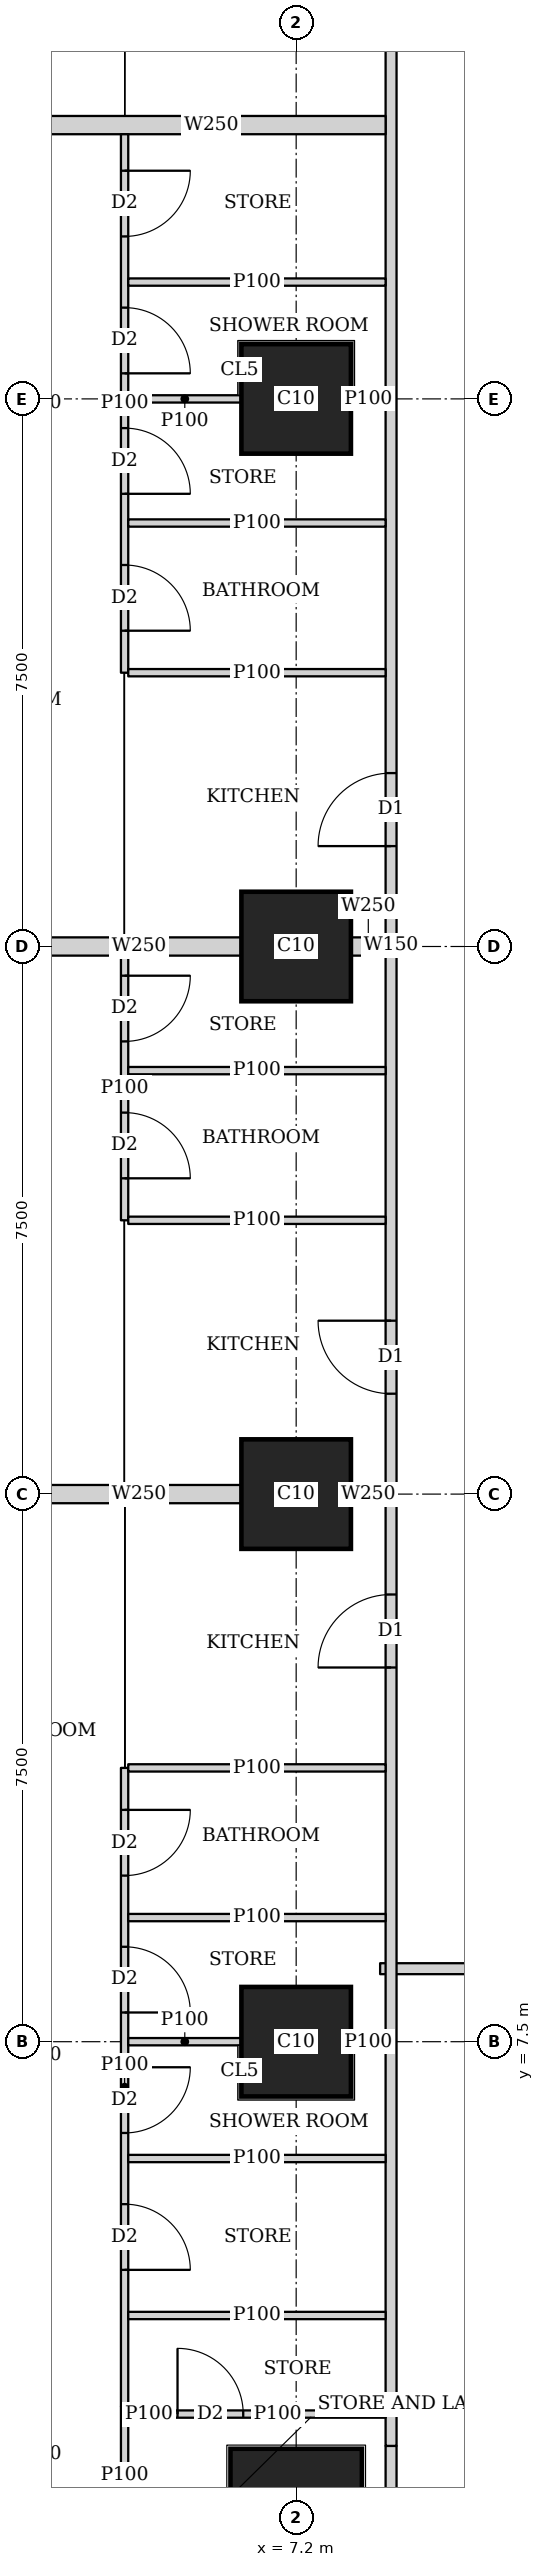
"""IFC4 building model, lengths in metres.
Left out: names, types, materials, properties, quantities, classifications, styles, units other than length and angle.
Written with IfcOpenShell. Run it as: python <this file> out.ifc"""

import sys

from ifc_helpers import new_model, si_unit, direction, frame, frame_2d, origin, origin_2d, place, context, subcontext, project, spatial, rectangle, extrude, element, fill, save


model = new_model("IFC4")
c1 = context("Model", 3, precision=1e-05, world=origin(), true_north=direction((0.0, 1.0)))
c2 = subcontext(c1, "Body", "Model", "MODEL_VIEW")
j1 = project(units=[si_unit("LENGTHUNIT", "METRE"), si_unit("PLANEANGLEUNIT", "RADIAN")], contexts=[c1])
p1 = place(None, origin())
s1 = spatial("IfcSite", under=j1, at=p1, CompositionType="ELEMENT")
p2 = place(p1, origin())
s2 = spatial("IfcBuilding", under=s1, at=p2, CompositionType="ELEMENT")
p3 = place(p2, frame((0.0, 0.0, 180.8)))
s3 = spatial("IfcBuildingStorey", under=s2, at=p3, CompositionType="ELEMENT", Elevation=180.8)
p4 = place(p3, frame((7.2, 1.025, 0.0), z_axis=(0.0, 0.0, 1.0), x_axis=(1.0, 0.0, 0.0)))
e1 = element("IfcColumn", 1, at=p4, inside=s3, PredefinedType="COLUMN", context=c2, shape_type="SweptSolid", body=[
    extrude(rectangle(XDim=1.8, YDim=1.8, at=origin_2d()), origin(), (0.0, 0.0, 1.0), 3.75),
])
for number, where, z_axis, x_axis in (
    (2, (7.2, 7.5, 0.0), (0.0, 0.0, 1.0), (1.0, 0.0, 0.0)),
    (3, (7.2, 15.0, 0.0), (0.0, 0.0, 1.0), (1.0, 0.0, 0.0)),
    (4, (7.2, 22.5, 0.0), (0.0, 0.0, 1.0), (1.0, 0.0, 0.0)),
    (5, (7.2, 30.0, 0.0), (0.0, 0.0, 1.0), (1.0, 0.0, 0.0)),
):
    element("IfcColumn", number, at=place(p3, frame(where, z_axis=z_axis, x_axis=x_axis)), inside=s3, PredefinedType="COLUMN", context=c2, shape_type="SweptSolid", body=[
        extrude(rectangle(XDim=1.5, YDim=1.5, at=origin_2d()), origin(), (0.0, 0.0, 1.0), 3.75),
    ])
p5 = place(p3, frame((8.5, 0.159, 0.0), z_axis=(0.0, 0.0, 1.0), x_axis=(0.0, 1.0, 0.0)))
e6 = element("IfcWall", 6, at=p5, inside=s3, PredefinedType="SOLIDWALL", context=c2, shape_type="SweptSolid", body=[
    extrude(rectangle(XDim=1.805, YDim=0.15, at=frame_2d((0.903, 0.0))), origin(), (0.0, 0.0, 1.0), 2.1),
])
p6 = place(p3, frame((8.5, 1.964, 0.0), z_axis=(0.0, 0.0, 1.0), x_axis=(0.0, 1.0, 0.0)))
e7 = element("IfcWall", 7, at=p6, inside=s3, PredefinedType="SOLIDWALL", context=c2, shape_type="SweptSolid", body=[
    extrude(rectangle(XDim=41.097, YDim=0.15, at=frame_2d((20.548, 0.0))), origin(), (0.0, 0.0, 1.0), 3.5),
])
p7 = place(p6, frame((10.661, 0.0, 0.0)))
e8 = element("IfcOpeningElement", 8, at=p7, cuts=e7, PredefinedType="OPENING", context=c2, shape_type="SweptSolid", body=[
    extrude(rectangle(XDim=1.0, YDim=2.1, at=frame_2d((0.5, 1.05))), frame((0.0, 0.085, 0.0), z_axis=(0.0, -1.0, 0.0), x_axis=(1.0, 0.0, 0.0)), (0.0, 0.0, 1.0), 0.17),
])
p8 = place(p6, frame((14.411, 0.0, 0.0)))
e9 = element("IfcOpeningElement", 9, at=p8, cuts=e7, PredefinedType="OPENING", context=c2, shape_type="SweptSolid", body=[
    extrude(rectangle(XDim=1.0, YDim=2.1, at=frame_2d((0.5, 1.05))), frame((0.0, 0.085, 0.0), z_axis=(0.0, -1.0, 0.0), x_axis=(1.0, 0.0, 0.0)), (0.0, 0.0, 1.0), 0.17),
])
p9 = place(p6, frame((21.911, 0.0, 0.0)))
e10 = element("IfcOpeningElement", 10, at=p9, cuts=e7, PredefinedType="OPENING", context=c2, shape_type="SweptSolid", body=[
    extrude(rectangle(XDim=1.0, YDim=2.1, at=frame_2d((0.5, 1.05))), frame((0.0, 0.085, 0.0), z_axis=(0.0, -1.0, 0.0), x_axis=(1.0, 0.0, 0.0)), (0.0, 0.0, 1.0), 0.17),
])
p10 = place(p6, frame((33.161, 0.0, 0.0)))
e11 = element("IfcOpeningElement", 11, at=p10, cuts=e7, PredefinedType="OPENING", context=c2, shape_type="SweptSolid", body=[
    extrude(rectangle(XDim=1.0, YDim=2.1, at=frame_2d((0.5, 1.05))), frame((0.0, 0.085, 0.0), z_axis=(0.0, -1.0, 0.0), x_axis=(1.0, 0.0, 0.0)), (0.0, 0.0, 1.0), 0.17),
])
p11 = place(p3, frame((40.053, 8.5, 0.0), z_axis=(0.0, 0.0, 1.0), x_axis=(-1.0, 0.0, 0.0)))
e12 = element("IfcWall", 12, at=p11, inside=s3, PredefinedType="SOLIDWALL", context=c2, shape_type="SweptSolid", body=[
    extrude(rectangle(XDim=31.703, YDim=0.15, at=frame_2d((15.852, 0.0))), origin(), (0.0, 0.0, 1.0), 3.5),
])
p12 = place(p11, frame((28.103, 0.0, 0.0)))
e13 = element("IfcOpeningElement", 13, at=p12, cuts=e12, PredefinedType="OPENING", context=c2, shape_type="SweptSolid", body=[
    extrude(rectangle(XDim=1.0, YDim=2.1, at=frame_2d((0.5, 1.05))), frame((0.0, 0.085, 0.0), z_axis=(0.0, -1.0, 0.0), x_axis=(1.0, 0.0, 0.0)), (0.0, 0.0, 1.0), 0.17),
])
p13 = place(p11, frame((15.953, 0.0, 0.0)))
e14 = element("IfcOpeningElement", 14, at=p13, cuts=e12, PredefinedType="OPENING", context=c2, shape_type="SweptSolid", body=[
    extrude(rectangle(XDim=1.0, YDim=2.1, at=frame_2d((0.5, 1.05))), frame((0.0, 0.085, 0.0), z_axis=(0.0, -1.0, 0.0), x_axis=(1.0, 0.0, 0.0)), (0.0, 0.0, 1.0), 0.17),
])
p14 = place(p11, frame((8.753, 0.0, 0.0)))
e15 = element("IfcOpeningElement", 15, at=p14, cuts=e12, PredefinedType="OPENING", context=c2, shape_type="SweptSolid", body=[
    extrude(rectangle(XDim=1.0, YDim=2.1, at=frame_2d((0.5, 1.05))), frame((0.0, 0.085, 0.0), z_axis=(0.0, -1.0, 0.0), x_axis=(1.0, 0.0, 0.0)), (0.0, 0.0, 1.0), 0.17),
])
p15 = place(p3, frame((4.85, 0.634, 0.0), z_axis=(0.0, 0.0, 1.0), x_axis=(0.0, 1.0, 0.0)))
e16 = element("IfcWall", 16, at=p15, inside=s3, PredefinedType="PARTITIONING", context=c2, shape_type="SweptSolid", body=[
    extrude(rectangle(XDim=1.871, YDim=0.1, at=frame_2d((0.936, 0.0))), origin(), (0.0, 0.0, 1.0), 2.1),
])
p16 = place(p3, frame((4.85, 2.505, 0.0), z_axis=(0.0, 0.0, 1.0), x_axis=(0.0, 1.0, 0.0)))
e17 = element("IfcWall", 17, at=p16, inside=s3, PredefinedType="PARTITIONING", context=c2, shape_type="SweptSolid", body=[
    extrude(rectangle(XDim=8.745, YDim=0.1, at=frame_2d((4.373, 0.0))), origin(), (0.0, 0.0, 1.0), 3.5),
])
p17 = place(p16, frame((7.27, 0.0, 0.0)))
e18 = element("IfcOpeningElement", 18, at=p17, cuts=e17, PredefinedType="OPENING", context=c2, shape_type="SweptSolid", body=[
    extrude(rectangle(XDim=0.9, YDim=2.1, at=frame_2d((0.45, 1.05))), frame((0.0, 0.06, 0.0), z_axis=(0.0, -1.0, 0.0), x_axis=(1.0, 0.0, 0.0)), (0.0, 0.0, 1.0), 0.12),
])
p18 = place(p16, frame((3.745, 0.0, 0.0)))
e19 = element("IfcOpeningElement", 19, at=p18, cuts=e17, PredefinedType="OPENING", context=c2, shape_type="SweptSolid", body=[
    extrude(rectangle(XDim=0.9, YDim=2.1, at=frame_2d((0.45, 1.05))), frame((0.0, 0.06, 0.0), z_axis=(0.0, -1.0, 0.0), x_axis=(1.0, 0.0, 0.0)), (0.0, 0.0, 1.0), 0.12),
])
p19 = place(p16, frame((5.395, 0.0, 0.0)))
e20 = element("IfcOpeningElement", 20, at=p19, cuts=e17, PredefinedType="OPENING", context=c2, shape_type="SweptSolid", body=[
    extrude(rectangle(XDim=0.9, YDim=2.1, at=frame_2d((0.45, 1.05))), frame((0.0, 0.06, 0.0), z_axis=(0.0, -1.0, 0.0), x_axis=(1.0, 0.0, 0.0)), (0.0, 0.0, 1.0), 0.12),
])
p20 = place(p16, frame((1.87, 0.0, 0.0)))
e21 = element("IfcOpeningElement", 21, at=p20, cuts=e17, PredefinedType="OPENING", context=c2, shape_type="SweptSolid", body=[
    extrude(rectangle(XDim=0.9, YDim=2.1, at=frame_2d((0.45, 1.05))), frame((0.0, 0.06, 0.0), z_axis=(0.0, -1.0, 0.0), x_axis=(1.0, 0.0, 0.0)), (0.0, 0.0, 1.0), 0.12),
])
p21 = place(p3, frame((4.9, 3.75, 0.0), z_axis=(0.0, 0.0, 1.0), x_axis=(1.0, 0.0, 0.0)))
e22 = element("IfcWall", 22, at=p21, inside=s3, PredefinedType="PARTITIONING", context=c2, shape_type="SweptSolid", body=[
    extrude(rectangle(XDim=3.525, YDim=0.1, at=frame_2d((1.763, 0.0))), origin(), (0.0, 0.0, 1.0), 3.5),
])
p22 = place(p3, frame((4.9, 7.5, 0.0), z_axis=(0.0, 0.0, 1.0), x_axis=(1.0, 0.0, 0.0)))
e23 = element("IfcWall", 23, at=p22, inside=s3, PredefinedType="PARTITIONING", context=c2, shape_type="SweptSolid", body=[
    extrude(rectangle(XDim=1.549, YDim=0.1, at=frame_2d((0.774, 0.0))), origin(), (0.0, 0.0, 1.0), 3.5),
])
p23 = place(p3, frame((7.951, 7.5, 0.0), z_axis=(0.0, 0.0, 1.0), x_axis=(1.0, 0.0, 0.0)))
e24 = element("IfcWall", 24, at=p23, inside=s3, PredefinedType="PARTITIONING", context=c2, shape_type="SweptSolid", body=[
    extrude(rectangle(XDim=0.474, YDim=0.1, at=frame_2d((0.237, 0.0))), origin(), (0.0, 0.0, 1.0), 3.5),
])
for number, where, z_axis, x_axis in (
    (25, (4.9, 11.25, 0.0), (0.0, 0.0, 1.0), (1.0, 0.0, 0.0)),
    (26, (4.9, 9.2, 0.0), (0.0, 0.0, 1.0), (1.0, 0.0, 0.0)),
    (27, (4.9, 5.9, 0.0), (0.0, 0.0, 1.0), (1.0, 0.0, 0.0)),
):
    element("IfcWall", number, at=place(p3, frame(where, z_axis=z_axis, x_axis=x_axis)), inside=s3, PredefinedType="PARTITIONING", context=c2, shape_type="SweptSolid", body=[
        extrude(rectangle(XDim=3.525, YDim=0.1, at=frame_2d((1.763, 0.0))), origin(), (0.0, 0.0, 1.0), 3.5),
    ])
p24 = place(p3, frame((4.85, 18.75, 0.0), z_axis=(0.0, 0.0, 1.0), x_axis=(0.0, 1.0, 0.0)))
e28 = element("IfcWall", 28, at=p24, inside=s3, PredefinedType="PARTITIONING", context=c2, shape_type="SweptSolid", body=[
    extrude(rectangle(XDim=3.625, YDim=0.1, at=frame_2d((1.812, 0.0))), origin(), (0.0, 0.0, 1.0), 3.5),
])
p25 = place(p24, frame((0.575, 0.0, 0.0)))
e29 = element("IfcOpeningElement", 29, at=p25, cuts=e28, PredefinedType="OPENING", context=c2, shape_type="SweptSolid", body=[
    extrude(rectangle(XDim=0.9, YDim=2.1, at=frame_2d((0.45, 1.05))), frame((0.0, 0.06, 0.0), z_axis=(0.0, -1.0, 0.0), x_axis=(1.0, 0.0, 0.0)), (0.0, 0.0, 1.0), 0.12),
])
p26 = place(p24, frame((2.45, 0.0, 0.0)))
e30 = element("IfcOpeningElement", 30, at=p26, cuts=e28, PredefinedType="OPENING", context=c2, shape_type="SweptSolid", body=[
    extrude(rectangle(XDim=0.9, YDim=2.1, at=frame_2d((0.45, 1.05))), frame((0.0, 0.06, 0.0), z_axis=(0.0, -1.0, 0.0), x_axis=(1.0, 0.0, 0.0)), (0.0, 0.0, 1.0), 0.12),
])
for number, where, z_axis, x_axis in (
    (31, (4.9, 18.75, 0.0), (0.0, 0.0, 1.0), (1.0, 0.0, 0.0)),
    (32, (4.9, 20.8, 0.0), (0.0, 0.0, 1.0), (1.0, 0.0, 0.0)),
):
    element("IfcWall", number, at=place(p3, frame(where, z_axis=z_axis, x_axis=x_axis)), inside=s3, PredefinedType="PARTITIONING", context=c2, shape_type="SweptSolid", body=[
        extrude(rectangle(XDim=3.525, YDim=0.1, at=frame_2d((1.763, 0.0))), origin(), (0.0, 0.0, 1.0), 3.5),
    ])
p27 = place(p3, frame((3.65, 15.0, 0.0), z_axis=(0.0, 0.0, 1.0), x_axis=(1.0, 0.0, 0.0)))
e33 = element("IfcWall", 33, at=p27, inside=s3, PredefinedType="SOLIDWALL", context=c2, shape_type="SweptSolid", body=[
    extrude(rectangle(XDim=2.799, YDim=0.25, at=frame_2d((1.399, 0.0))), origin(), (0.0, 0.0, 1.0), 3.5),
])
p28 = place(p3, frame((7.951, 15.0, 0.0), z_axis=(0.0, 0.0, 1.0), x_axis=(1.0, 0.0, 0.0)))
e34 = element("IfcWall", 34, at=p28, inside=s3, PredefinedType="SOLIDWALL", context=c2, shape_type="SweptSolid", body=[
    extrude(rectangle(XDim=0.474, YDim=0.25, at=frame_2d((0.237, 0.0))), origin(), (0.0, 0.0, 1.0), 3.5),
])
p29 = place(p3, frame((4.85, 26.25, 0.0), z_axis=(0.0, 0.0, 1.0), x_axis=(0.0, 1.0, 0.0)))
e35 = element("IfcWall", 35, at=p29, inside=s3, PredefinedType="PARTITIONING", context=c2, shape_type="SweptSolid", body=[
    extrude(rectangle(XDim=7.375, YDim=0.1, at=frame_2d((3.688, 0.0))), origin(), (0.0, 0.0, 1.0), 3.5),
])
p30 = place(p29, frame((0.575, 0.0, 0.0)))
e36 = element("IfcOpeningElement", 36, at=p30, cuts=e35, PredefinedType="OPENING", context=c2, shape_type="SweptSolid", body=[
    extrude(rectangle(XDim=0.9, YDim=2.1, at=frame_2d((0.45, 1.05))), frame((0.0, 0.06, 0.0), z_axis=(0.0, -1.0, 0.0), x_axis=(1.0, 0.0, 0.0)), (0.0, 0.0, 1.0), 0.12),
])
p31 = place(p29, frame((4.1, 0.0, 0.0)))
e37 = element("IfcOpeningElement", 37, at=p31, cuts=e35, PredefinedType="OPENING", context=c2, shape_type="SweptSolid", body=[
    extrude(rectangle(XDim=0.9, YDim=2.1, at=frame_2d((0.45, 1.05))), frame((0.0, 0.06, 0.0), z_axis=(0.0, -1.0, 0.0), x_axis=(1.0, 0.0, 0.0)), (0.0, 0.0, 1.0), 0.12),
])
p32 = place(p29, frame((2.45, 0.0, 0.0)))
e38 = element("IfcOpeningElement", 38, at=p32, cuts=e35, PredefinedType="OPENING", context=c2, shape_type="SweptSolid", body=[
    extrude(rectangle(XDim=0.9, YDim=2.1, at=frame_2d((0.45, 1.05))), frame((0.0, 0.06, 0.0), z_axis=(0.0, -1.0, 0.0), x_axis=(1.0, 0.0, 0.0)), (0.0, 0.0, 1.0), 0.12),
])
p33 = place(p29, frame((5.975, 0.0, 0.0)))
e39 = element("IfcOpeningElement", 39, at=p33, cuts=e35, PredefinedType="OPENING", context=c2, shape_type="SweptSolid", body=[
    extrude(rectangle(XDim=0.9, YDim=2.1, at=frame_2d((0.45, 1.05))), frame((0.0, 0.06, 0.0), z_axis=(0.0, -1.0, 0.0), x_axis=(1.0, 0.0, 0.0)), (0.0, 0.0, 1.0), 0.12),
])
p34 = place(p3, frame((4.9, 26.25, 0.0), z_axis=(0.0, 0.0, 1.0), x_axis=(1.0, 0.0, 0.0)))
e40 = element("IfcWall", 40, at=p34, inside=s3, PredefinedType="PARTITIONING", context=c2, shape_type="SweptSolid", body=[
    extrude(rectangle(XDim=3.525, YDim=0.1, at=frame_2d((1.763, 0.0))), origin(), (0.0, 0.0, 1.0), 3.5),
])
p35 = place(p3, frame((4.9, 30.0, 0.0), z_axis=(0.0, 0.0, 1.0), x_axis=(1.0, 0.0, 0.0)))
e41 = element("IfcWall", 41, at=p35, inside=s3, PredefinedType="PARTITIONING", context=c2, shape_type="SweptSolid", body=[
    extrude(rectangle(XDim=1.549, YDim=0.1, at=frame_2d((0.774, 0.0))), origin(), (0.0, 0.0, 1.0), 3.5),
])
p36 = place(p3, frame((7.951, 30.0, 0.0), z_axis=(0.0, 0.0, 1.0), x_axis=(1.0, 0.0, 0.0)))
e42 = element("IfcWall", 42, at=p36, inside=s3, PredefinedType="PARTITIONING", context=c2, shape_type="SweptSolid", body=[
    extrude(rectangle(XDim=0.474, YDim=0.1, at=frame_2d((0.237, 0.0))), origin(), (0.0, 0.0, 1.0), 3.5),
])
for number, where, z_axis, x_axis in (
    (43, (4.9, 28.3, 0.0), (0.0, 0.0, 1.0), (1.0, 0.0, 0.0)),
    (44, (4.9, 31.6, 0.0), (0.0, 0.0, 1.0), (1.0, 0.0, 0.0)),
):
    element("IfcWall", number, at=place(p3, frame(where, z_axis=z_axis, x_axis=x_axis)), inside=s3, PredefinedType="PARTITIONING", context=c2, shape_type="SweptSolid", body=[
        extrude(rectangle(XDim=3.525, YDim=0.1, at=frame_2d((1.763, 0.0))), origin(), (0.0, 0.0, 1.0), 3.5),
    ])
p37 = place(p3, frame((3.65, 22.5, 0.0), z_axis=(0.0, 0.0, 1.0), x_axis=(1.0, 0.0, 0.0)))
e45 = element("IfcWall", 45, at=p37, inside=s3, PredefinedType="SOLIDWALL", context=c2, shape_type="SweptSolid", body=[
    extrude(rectangle(XDim=2.799, YDim=0.25, at=frame_2d((1.399, 0.0))), origin(), (0.0, 0.0, 1.0), 3.5),
])
p38 = place(p3, frame((7.951, 22.5, 0.0), z_axis=(0.0, 0.0, 1.0), x_axis=(1.0, 0.0, 0.0)))
e46 = element("IfcWall", 46, at=p38, inside=s3, PredefinedType="SOLIDWALL", context=c2, shape_type="SweptSolid", body=[
    extrude(rectangle(XDim=0.474, YDim=0.25, at=frame_2d((0.237, 0.0))), origin(), (0.0, 0.0, 1.0), 3.5),
])
p39 = place(p3, frame((3.65, 33.75, 0.0), z_axis=(0.0, 0.0, 1.0), x_axis=(1.0, 0.0, 0.0)))
e47 = element("IfcWall", 47, at=p39, inside=s3, PredefinedType="SOLIDWALL", context=c2, shape_type="SweptSolid", body=[
    extrude(rectangle(XDim=4.775, YDim=0.25, at=frame_2d((2.388, 0.0))), origin(), (0.0, 0.0, 1.0), 3.5),
])
p40 = place(p3, frame((5.467, 2.4, 0.0), z_axis=(0.0, 0.0, 1.0), x_axis=(1.0, 0.0, 0.0)))
e48 = element("IfcWall", 48, at=p40, inside=s3, PredefinedType="PARTITIONING", context=c2, shape_type="SweptSolid", body=[
    extrude(rectangle(XDim=2.958, YDim=0.1, at=frame_2d((1.479, 0.0))), origin(), (0.0, 0.0, 1.0), 3.5),
])
p41 = place(p40, frame((0.108, 0.0, 0.0)))
e49 = element("IfcOpeningElement", 49, at=p41, cuts=e48, PredefinedType="OPENING", context=c2, shape_type="SweptSolid", body=[
    extrude(rectangle(XDim=0.9, YDim=2.1, at=frame_2d((0.45, 1.05))), frame((0.0, 0.06, 0.0), z_axis=(0.0, -1.0, 0.0), x_axis=(1.0, 0.0, 0.0)), (0.0, 0.0, 1.0), 0.12),
])
p42 = place(p3, frame((5.467, 2.4, 0.0), z_axis=(0.0, 0.0, 1.0), x_axis=(-1.0, 0.0, 0.0)))
e50 = element("IfcWall", 50, at=p42, inside=s3, PredefinedType="PARTITIONING", context=c2, shape_type="SweptSolid", body=[
    extrude(rectangle(XDim=0.567, YDim=0.1, at=frame_2d((0.284, 0.0))), origin(), (0.0, 0.0, 1.0), 2.1),
])
p43 = place(p17, origin())
e51 = element("IfcDoor", 51, at=p43, inside=s3, OperationType="SINGLE_SWING_LEFT", PredefinedType="DOOR", context=c2, shape_type="SweptSolid", body=[
    extrude(rectangle(XDim=0.9, YDim=2.1, at=frame_2d((0.45, 1.05))), frame((0.0, 0.025, 0.0), z_axis=(0.0, -1.0, 0.0), x_axis=(1.0, 0.0, 0.0)), (0.0, 0.0, 1.0), 0.05),
])
fill(e18, e51)
p44 = place(p18, origin())
e52 = element("IfcDoor", 52, at=p44, inside=s3, OperationType="SINGLE_SWING_LEFT", PredefinedType="DOOR", context=c2, shape_type="SweptSolid", body=[
    extrude(rectangle(XDim=0.9, YDim=2.1, at=frame_2d((0.45, 1.05))), frame((0.0, 0.025, 0.0), z_axis=(0.0, -1.0, 0.0), x_axis=(1.0, 0.0, 0.0)), (0.0, 0.0, 1.0), 0.05),
])
fill(e19, e52)
p45 = place(p19, origin())
e53 = element("IfcDoor", 53, at=p45, inside=s3, OperationType="SINGLE_SWING_RIGHT", PredefinedType="DOOR", context=c2, shape_type="SweptSolid", body=[
    extrude(rectangle(XDim=0.9, YDim=2.1, at=frame_2d((0.45, 1.05))), frame((0.0, 0.025, 0.0), z_axis=(0.0, -1.0, 0.0), x_axis=(1.0, 0.0, 0.0)), (0.0, 0.0, 1.0), 0.05),
])
fill(e20, e53)
p46 = place(p20, origin())
e54 = element("IfcDoor", 54, at=p46, inside=s3, OperationType="SINGLE_SWING_RIGHT", PredefinedType="DOOR", context=c2, shape_type="SweptSolid", body=[
    extrude(rectangle(XDim=0.9, YDim=2.1, at=frame_2d((0.45, 1.05))), frame((0.0, 0.025, 0.0), z_axis=(0.0, -1.0, 0.0), x_axis=(1.0, 0.0, 0.0)), (0.0, 0.0, 1.0), 0.05),
])
fill(e21, e54)
p47 = place(p7, origin())
e55 = element("IfcDoor", 55, at=p47, inside=s3, OperationType="SINGLE_SWING_LEFT", PredefinedType="DOOR", context=c2, shape_type="SweptSolid", body=[
    extrude(rectangle(XDim=1.0, YDim=2.1, at=frame_2d((0.5, 1.05))), frame((0.0, 0.025, 0.0), z_axis=(0.0, -1.0, 0.0), x_axis=(1.0, 0.0, 0.0)), (0.0, 0.0, 1.0), 0.05),
])
fill(e8, e55)
p48 = place(p25, origin())
e56 = element("IfcDoor", 56, at=p48, inside=s3, OperationType="SINGLE_SWING_RIGHT", PredefinedType="DOOR", context=c2, shape_type="SweptSolid", body=[
    extrude(rectangle(XDim=0.9, YDim=2.1, at=frame_2d((0.45, 1.05))), frame((0.0, 0.025, 0.0), z_axis=(0.0, -1.0, 0.0), x_axis=(1.0, 0.0, 0.0)), (0.0, 0.0, 1.0), 0.05),
])
fill(e29, e56)
p49 = place(p26, origin())
e57 = element("IfcDoor", 57, at=p49, inside=s3, OperationType="SINGLE_SWING_LEFT", PredefinedType="DOOR", context=c2, shape_type="SweptSolid", body=[
    extrude(rectangle(XDim=0.9, YDim=2.1, at=frame_2d((0.45, 1.05))), frame((0.0, 0.025, 0.0), z_axis=(0.0, -1.0, 0.0), x_axis=(1.0, 0.0, 0.0)), (0.0, 0.0, 1.0), 0.05),
])
fill(e30, e57)
p50 = place(p8, origin())
e58 = element("IfcDoor", 58, at=p50, inside=s3, OperationType="SINGLE_SWING_RIGHT", PredefinedType="DOOR", context=c2, shape_type="SweptSolid", body=[
    extrude(rectangle(XDim=1.0, YDim=2.1, at=frame_2d((0.5, 1.05))), frame((0.0, 0.025, 0.0), z_axis=(0.0, -1.0, 0.0), x_axis=(1.0, 0.0, 0.0)), (0.0, 0.0, 1.0), 0.05),
])
fill(e9, e58)
p51 = place(p30, origin())
e59 = element("IfcDoor", 59, at=p51, inside=s3, OperationType="SINGLE_SWING_RIGHT", PredefinedType="DOOR", context=c2, shape_type="SweptSolid", body=[
    extrude(rectangle(XDim=0.9, YDim=2.1, at=frame_2d((0.45, 1.05))), frame((0.0, 0.025, 0.0), z_axis=(0.0, -1.0, 0.0), x_axis=(1.0, 0.0, 0.0)), (0.0, 0.0, 1.0), 0.05),
])
fill(e36, e59)
p52 = place(p31, origin())
e60 = element("IfcDoor", 60, at=p52, inside=s3, OperationType="SINGLE_SWING_RIGHT", PredefinedType="DOOR", context=c2, shape_type="SweptSolid", body=[
    extrude(rectangle(XDim=0.9, YDim=2.1, at=frame_2d((0.45, 1.05))), frame((0.0, 0.025, 0.0), z_axis=(0.0, -1.0, 0.0), x_axis=(1.0, 0.0, 0.0)), (0.0, 0.0, 1.0), 0.05),
])
fill(e37, e60)
p53 = place(p32, origin())
e61 = element("IfcDoor", 61, at=p53, inside=s3, OperationType="SINGLE_SWING_RIGHT", PredefinedType="DOOR", context=c2, shape_type="SweptSolid", body=[
    extrude(rectangle(XDim=0.9, YDim=2.1, at=frame_2d((0.45, 1.05))), frame((0.0, 0.025, 0.0), z_axis=(0.0, -1.0, 0.0), x_axis=(1.0, 0.0, 0.0)), (0.0, 0.0, 1.0), 0.05),
])
fill(e38, e61)
p54 = place(p33, origin())
e62 = element("IfcDoor", 62, at=p54, inside=s3, OperationType="SINGLE_SWING_LEFT", PredefinedType="DOOR", context=c2, shape_type="SweptSolid", body=[
    extrude(rectangle(XDim=0.9, YDim=2.1, at=frame_2d((0.45, 1.05))), frame((0.0, 0.025, 0.0), z_axis=(0.0, -1.0, 0.0), x_axis=(1.0, 0.0, 0.0)), (0.0, 0.0, 1.0), 0.05),
])
fill(e39, e62)
p55 = place(p9, origin())
e63 = element("IfcDoor", 63, at=p55, inside=s3, OperationType="SINGLE_SWING_LEFT", PredefinedType="DOOR", context=c2, shape_type="SweptSolid", body=[
    extrude(rectangle(XDim=1.0, YDim=2.1, at=frame_2d((0.5, 1.05))), frame((0.0, 0.025, 0.0), z_axis=(0.0, -1.0, 0.0), x_axis=(1.0, 0.0, 0.0)), (0.0, 0.0, 1.0), 0.05),
])
fill(e10, e63)
p56 = place(p41, origin())
e64 = element("IfcDoor", 64, at=p56, inside=s3, OperationType="SINGLE_SWING_LEFT", PredefinedType="DOOR", context=c2, shape_type="SweptSolid", body=[
    extrude(rectangle(XDim=0.9, YDim=2.1, at=frame_2d((0.45, 1.05))), frame((0.0, 0.025, 0.0), z_axis=(0.0, -1.0, 0.0), x_axis=(1.0, 0.0, 0.0)), (0.0, 0.0, 1.0), 0.05),
])
fill(e49, e64)
save(model, sys.argv[1])
